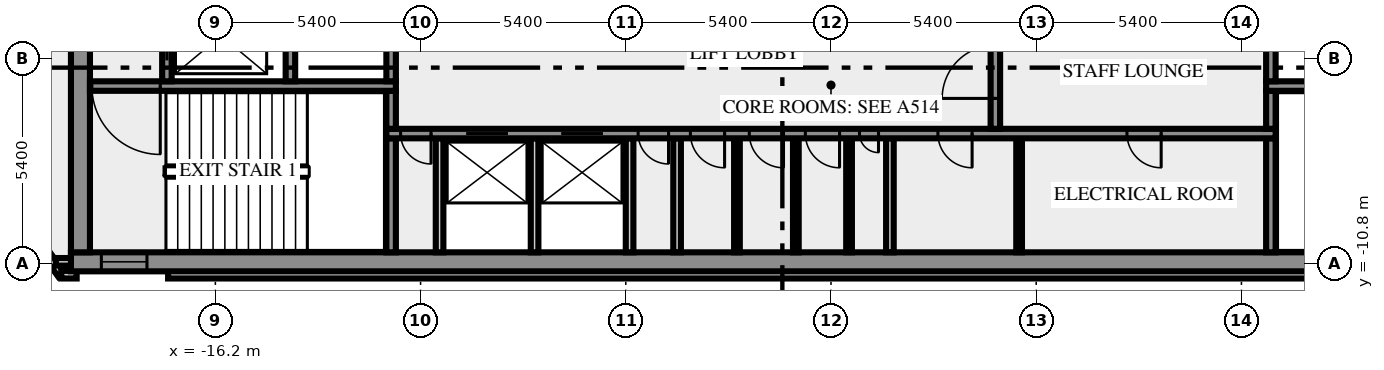
"""IFC4 building model, lengths in metres.
Left out: names, types, materials, properties, quantities, classifications, styles, units other than length and angle.
Written with IfcOpenShell. Run it as: python <this file> out.ifc"""

import sys

from ifc_helpers import new_model, si_unit, direction, frame, frame_2d, origin, place, context, subcontext, project, spatial, rectangle, extrude, element, fill, save


model = new_model("IFC4")
c1 = context("Model", 3, precision=1e-05, world=origin(), true_north=direction((0.0, 1.0)))
c2 = subcontext(c1, "Body", "Model", "MODEL_VIEW")
j1 = project(units=[si_unit("LENGTHUNIT", "METRE"), si_unit("PLANEANGLEUNIT", "RADIAN")], contexts=[c1])
p1 = place(None, origin())
s1 = spatial("IfcSite", under=j1, at=p1, CompositionType="ELEMENT")
p2 = place(p1, origin())
s2 = spatial("IfcBuilding", under=s1, at=p2, CompositionType="ELEMENT")
p3 = place(p2, frame((0.0, 0.0, 293.0)))
s3 = spatial("IfcBuildingStorey", under=s2, at=p3, CompositionType="ELEMENT", Elevation=293.0)
p4 = place(p3, frame((-21.833, -8.909, 0.0), z_axis=(0.0, 0.0, 1.0), x_axis=(0.587766567315, -0.809030569476, 0.0)))
e1 = element("IfcWall", 1, at=p4, inside=s3, PredefinedType="SOLIDWALL", context=c2, shape_type="SweptSolid", body=[
    extrude(rectangle(XDim=2.688, YDim=0.2, at=frame_2d((1.344, 0.0))), origin(), (0.0, 0.0, 1.0), 3.65),
])
p5 = place(p3, frame((-20.256, -11.088, 0.0), z_axis=(0.0, 0.0, 1.0), x_axis=(1.0, 0.0, 0.0)))
e2 = element("IfcWall", 2, at=p5, inside=s3, PredefinedType="SOLIDWALL", context=c2, shape_type="SweptSolid", body=[
    extrude(rectangle(XDim=0.406, YDim=0.2, at=frame_2d((0.203, 0.0))), origin(), (0.0, 0.0, 1.0), 3.65),
])
p6 = place(p3, frame((-17.444, -11.088, 0.0), z_axis=(0.0, 0.0, 1.0), x_axis=(1.0, 0.0, 0.0)))
e3 = element("IfcWall", 3, at=p6, inside=s3, PredefinedType="SOLIDWALL", context=c2, shape_type="SweptSolid", body=[
    extrude(rectangle(XDim=34.888, YDim=0.2, at=frame_2d((17.444, 0.0))), origin(), (0.0, 0.0, 1.0), 3.65),
])
p7 = place(p3, frame((-19.98, -10.75, 0.0), z_axis=(0.0, 0.0, 1.0), x_axis=(-1.0, 0.0, 0.0)))
e4 = element("IfcWall", 4, at=p7, inside=s3, PredefinedType="SOLIDWALL", context=c2, shape_type="SweptSolid", body=[
    extrude(rectangle(XDim=0.417, YDim=0.2, at=frame_2d((0.208, 0.0))), origin(), (0.0, 0.0, 1.0), 3.65),
])
p8 = place(p3, frame((-20.0, -10.75, 0.0), z_axis=(0.0, 0.0, 1.0), x_axis=(1.0, 0.0, 0.0)))
e5 = element("IfcWall", 5, at=p8, inside=s3, PredefinedType="SHEAR", context=c2, shape_type="SweptSolid", body=[
    extrude(rectangle(XDim=40.0, YDim=0.5, at=frame_2d((20.0, 0.0))), origin(), (0.0, 0.0, 1.0), 3.65),
])
p9 = place(p8, frame((0.8, 0.0, 1.0)))
e6 = element("IfcOpeningElement", 6, at=p9, cuts=e5, PredefinedType="OPENING", context=c2, shape_type="SweptSolid", body=[
    extrude(rectangle(XDim=1.2, YDim=1.2, at=frame_2d((0.6, 0.6))), frame((0.0, 0.26, 0.0), z_axis=(0.0, -1.0, 0.0), x_axis=(1.0, 0.0, 0.0)), (0.0, 0.0, 1.0), 0.52),
])
p10 = place(p8, frame((38.0, 0.0, 1.0)))
e7 = element("IfcOpeningElement", 7, at=p10, cuts=e5, PredefinedType="OPENING", context=c2, shape_type="SweptSolid", body=[
    extrude(rectangle(XDim=1.2, YDim=1.2, at=frame_2d((0.6, 0.6))), frame((0.0, 0.26, 0.0), z_axis=(0.0, -1.0, 0.0), x_axis=(1.0, 0.0, 0.0)), (0.0, 0.0, 1.0), 0.52),
])
p11 = place(p3, frame((-19.75, -10.5, 0.0), z_axis=(0.0, 0.0, 1.0), x_axis=(0.0, 1.0, 0.0)))
e8 = element("IfcWall", 8, at=p11, inside=s3, PredefinedType="SHEAR", context=c2, shape_type="SweptSolid", body=[
    extrude(rectangle(XDim=8.8, YDim=0.5, at=frame_2d((4.4, 0.0))), origin(), (0.0, 0.0, 1.0), 3.65),
])
p12 = place(p3, frame((-11.575, -10.5, 0.0), z_axis=(0.0, 0.0, 1.0), x_axis=(0.0, 1.0, 0.0)))
e9 = element("IfcWall", 9, at=p12, inside=s3, PredefinedType="SHEAR", context=c2, shape_type="SweptSolid", body=[
    extrude(rectangle(XDim=3.0, YDim=0.25, at=frame_2d((1.5, 0.0))), origin(), (0.0, 0.0, 1.0), 3.65),
])
for number, where, z_axis, x_axis in (
    (10, (-10.3, -10.5, 0.0), (0.0, 0.0, 1.0), (0.0, 1.0, 0.0)),
    (11, (-7.8, -10.5, 0.0), (0.0, 0.0, 1.0), (0.0, 1.0, 0.0)),
    (12, (-5.3, -10.5, 0.0), (0.0, 0.0, 1.0), (0.0, 1.0, 0.0)),
    (13, (-4.05, -10.5, 0.0), (0.0, 0.0, 1.0), (0.0, 1.0, 0.0)),
):
    element("IfcWall", number, at=place(p3, frame(where, z_axis=z_axis, x_axis=x_axis)), inside=s3, PredefinedType="SOLIDWALL", context=c2, shape_type="SweptSolid", body=[
        extrude(rectangle(XDim=3.0, YDim=0.2, at=frame_2d((1.5, 0.0))), origin(), (0.0, 0.0, 1.0), 3.65),
    ])
for number, where, z_axis, x_axis in (
    (14, (-2.475, -10.5, 0.0), (0.0, 0.0, 1.0), (0.0, 1.0, 0.0)),
    (15, (-0.925, -10.5, 0.0), (0.0, 0.0, 1.0), (0.0, 1.0, 0.0)),
    (16, (0.475, -10.5, 0.0), (0.0, 0.0, 1.0), (0.0, 1.0, 0.0)),
):
    element("IfcWall", number, at=place(p3, frame(where, z_axis=z_axis, x_axis=x_axis)), inside=s3, PredefinedType="PARTITIONING", context=c2, shape_type="SweptSolid", body=[
        extrude(rectangle(XDim=3.0, YDim=0.15, at=frame_2d((1.5, 0.0))), origin(), (0.0, 0.0, 1.0), 3.65),
    ])
p13 = place(p3, frame((1.55, -10.5, 0.0), z_axis=(0.0, 0.0, 1.0), x_axis=(0.0, 1.0, 0.0)))
e17 = element("IfcWall", 17, at=p13, inside=s3, PredefinedType="SOLIDWALL", context=c2, shape_type="SweptSolid", body=[
    extrude(rectangle(XDim=3.0, YDim=0.2, at=frame_2d((1.5, 0.0))), origin(), (0.0, 0.0, 1.0), 3.65),
])
p14 = place(p3, frame((4.95, -10.5, 0.0), z_axis=(0.0, 0.0, 1.0), x_axis=(0.0, 1.0, 0.0)))
e18 = element("IfcWall", 18, at=p14, inside=s3, PredefinedType="PARTITIONING", context=c2, shape_type="SweptSolid", body=[
    extrude(rectangle(XDim=3.0, YDim=0.15, at=frame_2d((1.5, 0.0))), origin(), (0.0, 0.0, 1.0), 3.65),
])
p15 = place(p3, frame((11.575, -10.5, 0.0), z_axis=(0.0, 0.0, 1.0), x_axis=(0.0, 1.0, 0.0)))
e19 = element("IfcWall", 19, at=p15, inside=s3, PredefinedType="SHEAR", context=c2, shape_type="SweptSolid", body=[
    extrude(rectangle(XDim=3.0, YDim=0.25, at=frame_2d((1.5, 0.0))), origin(), (0.0, 0.0, 1.0), 3.65),
])
p16 = place(p3, frame((11.7, -7.375, 0.0), z_axis=(0.0, 0.0, 1.0), x_axis=(-1.0, 0.0, 0.0)))
e20 = element("IfcWall", 20, at=p16, inside=s3, PredefinedType="SHEAR", context=c2, shape_type="SweptSolid", body=[
    extrude(rectangle(XDim=23.4, YDim=0.25, at=frame_2d((11.7, 0.0))), origin(), (0.0, 0.0, 1.0), 3.65),
])
p17 = place(p16, frame((22.225, 0.0, 0.0)))
e21 = element("IfcOpeningElement", 21, at=p17, cuts=e20, PredefinedType="OPENING", context=c2, shape_type="SweptSolid", body=[
    extrude(rectangle(XDim=0.8, YDim=2.1, at=frame_2d((0.4, 1.05))), frame((0.0, 0.135, 0.0), z_axis=(0.0, -1.0, 0.0), x_axis=(1.0, 0.0, 0.0)), (0.0, 0.0, 1.0), 0.27),
])
p18 = place(p16, frame((20.2, 0.0, 0.0)))
e22 = element("IfcOpeningElement", 22, at=p18, cuts=e20, PredefinedType="OPENING", context=c2, shape_type="SweptSolid", body=[
    extrude(rectangle(XDim=1.1, YDim=2.1, at=frame_2d((0.55, 1.05))), frame((0.0, 0.135, 0.0), z_axis=(0.0, -1.0, 0.0), x_axis=(1.0, 0.0, 0.0)), (0.0, 0.0, 1.0), 0.27),
])
p19 = place(p16, frame((17.7, 0.0, 0.0)))
e23 = element("IfcOpeningElement", 23, at=p19, cuts=e20, PredefinedType="OPENING", context=c2, shape_type="SweptSolid", body=[
    extrude(rectangle(XDim=1.1, YDim=2.1, at=frame_2d((0.55, 1.05))), frame((0.0, 0.135, 0.0), z_axis=(0.0, -1.0, 0.0), x_axis=(1.0, 0.0, 0.0)), (0.0, 0.0, 1.0), 0.27),
])
p20 = place(p16, frame((15.975, 0.0, 0.0)))
e24 = element("IfcOpeningElement", 24, at=p20, cuts=e20, PredefinedType="OPENING", context=c2, shape_type="SweptSolid", body=[
    extrude(rectangle(XDim=0.8, YDim=2.1, at=frame_2d((0.4, 1.05))), frame((0.0, 0.135, 0.0), z_axis=(0.0, -1.0, 0.0), x_axis=(1.0, 0.0, 0.0)), (0.0, 0.0, 1.0), 0.27),
])
p21 = place(p16, frame((14.5, 0.0, 0.0)))
e25 = element("IfcOpeningElement", 25, at=p21, cuts=e20, PredefinedType="OPENING", context=c2, shape_type="SweptSolid", body=[
    extrude(rectangle(XDim=0.9, YDim=2.1, at=frame_2d((0.45, 1.05))), frame((0.0, 0.135, 0.0), z_axis=(0.0, -1.0, 0.0), x_axis=(1.0, 0.0, 0.0)), (0.0, 0.0, 1.0), 0.27),
])
p22 = place(p16, frame((12.95, 0.0, 0.0)))
e26 = element("IfcOpeningElement", 26, at=p22, cuts=e20, PredefinedType="OPENING", context=c2, shape_type="SweptSolid", body=[
    extrude(rectangle(XDim=0.9, YDim=2.1, at=frame_2d((0.45, 1.05))), frame((0.0, 0.135, 0.0), z_axis=(0.0, -1.0, 0.0), x_axis=(1.0, 0.0, 0.0)), (0.0, 0.0, 1.0), 0.27),
])
p23 = place(p16, frame((11.475, 0.0, 0.0)))
e27 = element("IfcOpeningElement", 27, at=p23, cuts=e20, PredefinedType="OPENING", context=c2, shape_type="SweptSolid", body=[
    extrude(rectangle(XDim=0.9, YDim=2.1, at=frame_2d((0.45, 1.05))), frame((0.0, 0.135, 0.0), z_axis=(0.0, -1.0, 0.0), x_axis=(1.0, 0.0, 0.0)), (0.0, 0.0, 1.0), 0.27),
])
p24 = place(p16, frame((10.45, 0.0, 0.0)))
e28 = element("IfcOpeningElement", 28, at=p24, cuts=e20, PredefinedType="OPENING", context=c2, shape_type="SweptSolid", body=[
    extrude(rectangle(XDim=0.5, YDim=2.1, at=frame_2d((0.25, 1.05))), frame((0.0, 0.135, 0.0), z_axis=(0.0, -1.0, 0.0), x_axis=(1.0, 0.0, 0.0)), (0.0, 0.0, 1.0), 0.27),
])
p25 = place(p16, frame((7.987, 0.0, 0.0)))
e29 = element("IfcOpeningElement", 29, at=p25, cuts=e20, PredefinedType="OPENING", context=c2, shape_type="SweptSolid", body=[
    extrude(rectangle(XDim=0.9, YDim=2.1, at=frame_2d((0.45, 1.05))), frame((0.0, 0.135, 0.0), z_axis=(0.0, -1.0, 0.0), x_axis=(1.0, 0.0, 0.0)), (0.0, 0.0, 1.0), 0.27),
])
p26 = place(p16, frame((3.012, 0.0, 0.0)))
e30 = element("IfcOpeningElement", 30, at=p26, cuts=e20, PredefinedType="OPENING", context=c2, shape_type="SweptSolid", body=[
    extrude(rectangle(XDim=0.9, YDim=2.1, at=frame_2d((0.45, 1.05))), frame((0.0, 0.135, 0.0), z_axis=(0.0, -1.0, 0.0), x_axis=(1.0, 0.0, 0.0)), (0.0, 0.0, 1.0), 0.27),
])
p27 = place(p3, frame((-11.575, -7.25, 0.0), z_axis=(0.0, 0.0, 1.0), x_axis=(0.0, 1.0, 0.0)))
e31 = element("IfcWall", 31, at=p27, inside=s3, PredefinedType="SHEAR", context=c2, shape_type="SweptSolid", body=[
    extrude(rectangle(XDim=1.0, YDim=0.25, at=frame_2d((0.5, 0.0))), origin(), (0.0, 0.0, 1.0), 3.65),
])
p28 = place(p3, frame((4.325, -7.25, 0.0), z_axis=(0.0, 0.0, 1.0), x_axis=(0.0, 1.0, 0.0)))
e32 = element("IfcWall", 32, at=p28, inside=s3, PredefinedType="SHEAR", context=c2, shape_type="SweptSolid", body=[
    extrude(rectangle(XDim=3.0, YDim=0.25, at=frame_2d((1.5, 0.0))), origin(), (0.0, 0.0, 1.0), 3.65),
])
p29 = place(p28, frame((0.8, 0.0, 0.0)))
e33 = element("IfcOpeningElement", 33, at=p29, cuts=e32, PredefinedType="OPENING", context=c2, shape_type="SweptSolid", body=[
    extrude(rectangle(XDim=1.4, YDim=2.1, at=frame_2d((0.7, 1.05))), frame((0.0, 0.135, 0.0), z_axis=(0.0, -1.0, 0.0), x_axis=(1.0, 0.0, 0.0)), (0.0, 0.0, 1.0), 0.27),
])
p30 = place(p3, frame((11.575, -7.25, 0.0), z_axis=(0.0, 0.0, 1.0), x_axis=(0.0, 1.0, 0.0)))
e34 = element("IfcWall", 34, at=p30, inside=s3, PredefinedType="SHEAR", context=c2, shape_type="SweptSolid", body=[
    extrude(rectangle(XDim=1.0, YDim=0.25, at=frame_2d((0.5, 0.0))), origin(), (0.0, 0.0, 1.0), 3.65),
])
p31 = place(p3, frame((-11.45, -6.125, 0.0), z_axis=(0.0, 0.0, 1.0), x_axis=(-1.0, 0.0, 0.0)))
e35 = element("IfcWall", 35, at=p31, inside=s3, PredefinedType="SHEAR", context=c2, shape_type="SweptSolid", body=[
    extrude(rectangle(XDim=8.05, YDim=0.25, at=frame_2d((4.025, 0.0))), origin(), (0.0, 0.0, 1.0), 3.65),
])
p32 = place(p31, frame((6.2, 0.0, 0.0)))
e36 = element("IfcOpeningElement", 36, at=p32, cuts=e35, PredefinedType="OPENING", context=c2, shape_type="SweptSolid", body=[
    extrude(rectangle(XDim=1.8, YDim=2.1, at=frame_2d((0.9, 1.05))), frame((0.0, 0.135, 0.0), z_axis=(0.0, -1.0, 0.0), x_axis=(1.0, 0.0, 0.0)), (0.0, 0.0, 1.0), 0.27),
])
p33 = place(p3, frame((19.5, -6.125, 0.0), z_axis=(0.0, 0.0, 1.0), x_axis=(-1.0, 0.0, 0.0)))
e37 = element("IfcWall", 37, at=p33, inside=s3, PredefinedType="SHEAR", context=c2, shape_type="SweptSolid", body=[
    extrude(rectangle(XDim=8.05, YDim=0.25, at=frame_2d((4.025, 0.0))), origin(), (0.0, 0.0, 1.0), 3.65),
])
p34 = place(p33, frame((0.05, 0.0, 0.0)))
e38 = element("IfcOpeningElement", 38, at=p34, cuts=e37, PredefinedType="OPENING", context=c2, shape_type="SweptSolid", body=[
    extrude(rectangle(XDim=1.8, YDim=2.1, at=frame_2d((0.9, 1.05))), frame((0.0, 0.135, 0.0), z_axis=(0.0, -1.0, 0.0), x_axis=(1.0, 0.0, 0.0)), (0.0, 0.0, 1.0), 0.27),
])
p35 = place(p3, frame((-17.475, -6.0, 0.0), z_axis=(0.0, 0.0, 1.0), x_axis=(0.0, 1.0, 0.0)))
e39 = element("IfcWall", 39, at=p35, inside=s3, PredefinedType="SHEAR", context=c2, shape_type="SweptSolid", body=[
    extrude(rectangle(XDim=4.3, YDim=0.25, at=frame_2d((2.15, 0.0))), origin(), (0.0, 0.0, 1.0), 3.65),
])
p36 = place(p35, frame((0.55, 0.0, 0.0)))
e40 = element("IfcOpeningElement", 40, at=p36, cuts=e39, PredefinedType="OPENING", context=c2, shape_type="SweptSolid", body=[
    extrude(rectangle(XDim=1.3, YDim=2.1, at=frame_2d((0.65, 1.05))), frame((0.0, 0.135, 0.0), z_axis=(0.0, -1.0, 0.0), x_axis=(1.0, 0.0, 0.0)), (0.0, 0.0, 1.0), 0.27),
])
p37 = place(p3, frame((-14.225, -6.0, 0.0), z_axis=(0.0, 0.0, 1.0), x_axis=(0.0, 1.0, 0.0)))
e41 = element("IfcWall", 41, at=p37, inside=s3, PredefinedType="SHEAR", context=c2, shape_type="SweptSolid", body=[
    extrude(rectangle(XDim=4.3, YDim=0.25, at=frame_2d((2.15, 0.0))), origin(), (0.0, 0.0, 1.0), 3.65),
])
for number, where, z_axis, x_axis in (
    (42, (-11.575, -6.0, 0.0), (0.0, 0.0, 1.0), (0.0, 1.0, 0.0)),
    (43, (11.575, -6.0, 0.0), (0.0, 0.0, 1.0), (0.0, 1.0, 0.0)),
):
    element("IfcWall", number, at=place(p3, frame(where, z_axis=z_axis, x_axis=x_axis)), inside=s3, PredefinedType="SHEAR", context=c2, shape_type="SweptSolid", body=[
        extrude(rectangle(XDim=1.75, YDim=0.25, at=frame_2d((0.875, 0.0))), origin(), (0.0, 0.0, 1.0), 3.65),
    ])
p38 = place(p9, origin())
e44 = element("IfcWindow", 44, at=p38, inside=s3, PartitioningType="SINGLE_PANEL", PredefinedType="WINDOW", context=c2, shape_type="SweptSolid", body=[
    extrude(rectangle(XDim=1.2, YDim=1.2, at=frame_2d((0.6, 0.6))), frame((0.0, 0.03, 0.0), z_axis=(0.0, -1.0, 0.0), x_axis=(1.0, 0.0, 0.0)), (0.0, 0.0, 1.0), 0.06),
])
fill(e6, e44)
p39 = place(p17, origin())
e45 = element("IfcDoor", 45, at=p39, inside=s3, OperationType="SINGLE_SWING_RIGHT", PredefinedType="DOOR", context=c2, shape_type="SweptSolid", body=[
    extrude(rectangle(XDim=0.8, YDim=2.1, at=frame_2d((0.4, 1.05))), frame((0.0, 0.025, 0.0), z_axis=(0.0, -1.0, 0.0), x_axis=(1.0, 0.0, 0.0)), (0.0, 0.0, 1.0), 0.05),
])
fill(e21, e45)
p40 = place(p18, origin())
e46 = element("IfcDoor", 46, at=p40, inside=s3, OperationType="DOUBLE_DOOR_SLIDING", PredefinedType="DOOR", context=c2, shape_type="SweptSolid", body=[
    extrude(rectangle(XDim=1.1, YDim=2.1, at=frame_2d((0.55, 1.05))), frame((0.0, 0.025, 0.0), z_axis=(0.0, -1.0, 0.0), x_axis=(1.0, 0.0, 0.0)), (0.0, 0.0, 1.0), 0.05),
])
fill(e22, e46)
p41 = place(p19, origin())
e47 = element("IfcDoor", 47, at=p41, inside=s3, OperationType="DOUBLE_DOOR_SLIDING", PredefinedType="DOOR", context=c2, shape_type="SweptSolid", body=[
    extrude(rectangle(XDim=1.1, YDim=2.1, at=frame_2d((0.55, 1.05))), frame((0.0, 0.025, 0.0), z_axis=(0.0, -1.0, 0.0), x_axis=(1.0, 0.0, 0.0)), (0.0, 0.0, 1.0), 0.05),
])
fill(e23, e47)
p42 = place(p20, origin())
e48 = element("IfcDoor", 48, at=p42, inside=s3, OperationType="SINGLE_SWING_RIGHT", PredefinedType="DOOR", context=c2, shape_type="SweptSolid", body=[
    extrude(rectangle(XDim=0.8, YDim=2.1, at=frame_2d((0.4, 1.05))), frame((0.0, 0.025, 0.0), z_axis=(0.0, -1.0, 0.0), x_axis=(1.0, 0.0, 0.0)), (0.0, 0.0, 1.0), 0.05),
])
fill(e24, e48)
p43 = place(p21, origin())
e49 = element("IfcDoor", 49, at=p43, inside=s3, OperationType="SINGLE_SWING_RIGHT", PredefinedType="DOOR", context=c2, shape_type="SweptSolid", body=[
    extrude(rectangle(XDim=0.9, YDim=2.1, at=frame_2d((0.45, 1.05))), frame((0.0, 0.025, 0.0), z_axis=(0.0, -1.0, 0.0), x_axis=(1.0, 0.0, 0.0)), (0.0, 0.0, 1.0), 0.05),
])
fill(e25, e49)
p44 = place(p22, origin())
e50 = element("IfcDoor", 50, at=p44, inside=s3, OperationType="SINGLE_SWING_RIGHT", PredefinedType="DOOR", context=c2, shape_type="SweptSolid", body=[
    extrude(rectangle(XDim=0.9, YDim=2.1, at=frame_2d((0.45, 1.05))), frame((0.0, 0.025, 0.0), z_axis=(0.0, -1.0, 0.0), x_axis=(1.0, 0.0, 0.0)), (0.0, 0.0, 1.0), 0.05),
])
fill(e26, e50)
p45 = place(p23, origin())
e51 = element("IfcDoor", 51, at=p45, inside=s3, OperationType="SINGLE_SWING_RIGHT", PredefinedType="DOOR", context=c2, shape_type="SweptSolid", body=[
    extrude(rectangle(XDim=0.9, YDim=2.1, at=frame_2d((0.45, 1.05))), frame((0.0, 0.025, 0.0), z_axis=(0.0, -1.0, 0.0), x_axis=(1.0, 0.0, 0.0)), (0.0, 0.0, 1.0), 0.05),
])
fill(e27, e51)
p46 = place(p24, origin())
e52 = element("IfcDoor", 52, at=p46, inside=s3, OperationType="SINGLE_SWING_LEFT", PredefinedType="DOOR", context=c2, shape_type="SweptSolid", body=[
    extrude(rectangle(XDim=0.5, YDim=2.1, at=frame_2d((0.25, 1.05))), frame((0.0, 0.025, 0.0), z_axis=(0.0, -1.0, 0.0), x_axis=(1.0, 0.0, 0.0)), (0.0, 0.0, 1.0), 0.05),
])
fill(e28, e52)
p47 = place(p25, origin())
e53 = element("IfcDoor", 53, at=p47, inside=s3, OperationType="SINGLE_SWING_LEFT", PredefinedType="DOOR", context=c2, shape_type="SweptSolid", body=[
    extrude(rectangle(XDim=0.9, YDim=2.1, at=frame_2d((0.45, 1.05))), frame((0.0, 0.025, 0.0), z_axis=(0.0, -1.0, 0.0), x_axis=(1.0, 0.0, 0.0)), (0.0, 0.0, 1.0), 0.05),
])
fill(e29, e53)
p48 = place(p26, origin())
e54 = element("IfcDoor", 54, at=p48, inside=s3, OperationType="SINGLE_SWING_LEFT", PredefinedType="DOOR", context=c2, shape_type="SweptSolid", body=[
    extrude(rectangle(XDim=0.9, YDim=2.1, at=frame_2d((0.45, 1.05))), frame((0.0, 0.025, 0.0), z_axis=(0.0, -1.0, 0.0), x_axis=(1.0, 0.0, 0.0)), (0.0, 0.0, 1.0), 0.05),
])
fill(e30, e54)
p49 = place(p29, origin())
e55 = element("IfcDoor", 55, at=p49, inside=s3, OperationType="DOUBLE_DOOR_SINGLE_SWING", PredefinedType="DOOR", context=c2, shape_type="SweptSolid", body=[
    extrude(rectangle(XDim=1.4, YDim=2.1, at=frame_2d((0.7, 1.05))), frame((0.0, 0.025, 0.0), z_axis=(0.0, -1.0, 0.0), x_axis=(1.0, 0.0, 0.0)), (0.0, 0.0, 1.0), 0.05),
])
fill(e33, e55)
p50 = place(p32, origin())
e56 = element("IfcDoor", 56, at=p50, inside=s3, OperationType="DOUBLE_DOOR_SINGLE_SWING", PredefinedType="DOOR", context=c2, shape_type="SweptSolid", body=[
    extrude(rectangle(XDim=1.8, YDim=2.1, at=frame_2d((0.9, 1.05))), frame((0.0, 0.025, 0.0), z_axis=(0.0, -1.0, 0.0), x_axis=(1.0, 0.0, 0.0)), (0.0, 0.0, 1.0), 0.05),
])
fill(e36, e56)
p51 = place(p36, origin())
e57 = element("IfcDoor", 57, at=p51, inside=s3, OperationType="DOUBLE_DOOR_SLIDING", PredefinedType="DOOR", context=c2, shape_type="SweptSolid", body=[
    extrude(rectangle(XDim=1.3, YDim=2.1, at=frame_2d((0.65, 1.05))), frame((0.0, 0.025, 0.0), z_axis=(0.0, -1.0, 0.0), x_axis=(1.0, 0.0, 0.0)), (0.0, 0.0, 1.0), 0.05),
])
fill(e40, e57)
save(model, sys.argv[1])
